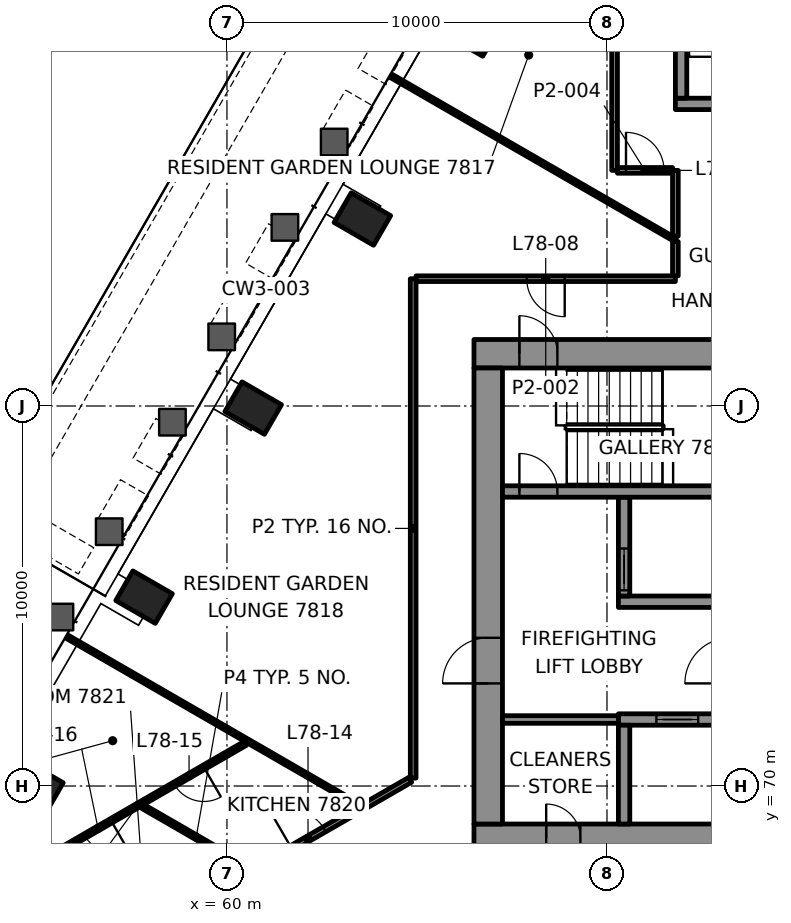
"""IFC4 building model, lengths in metres.
Left out: names, types, materials, properties, quantities, classifications, styles, units other than length and angle.
Written with IfcOpenShell. Run it as: python <this file> out.ifc"""

import sys

from ifc_helpers import new_model, si_unit, direction, frame, frame_2d, origin, origin_2d, place, context, subcontext, project, spatial, rectangle, hollow_rectangle, extrude, element, fill, save


model = new_model("IFC4")
c1 = context("Model", 3, precision=1e-05, world=origin(), true_north=direction((0.0, 1.0)))
c2 = subcontext(c1, "Body", "Model", "MODEL_VIEW")
j1 = project(units=[si_unit("LENGTHUNIT", "METRE"), si_unit("PLANEANGLEUNIT", "RADIAN")], contexts=[c1])
p1 = place(None, origin())
s1 = spatial("IfcSite", under=j1, at=p1, CompositionType="ELEMENT")
p2 = place(p1, origin())
s2 = spatial("IfcBuilding", under=s1, at=p2, CompositionType="ELEMENT")
p3 = place(p2, frame((0.0, 0.0, 319.6)))
s3 = spatial("IfcBuildingStorey", under=s2, at=p3, CompositionType="ELEMENT", Elevation=319.6)
for number, where, z_axis, x_axis in (
    (1, (66.435, 89.894, -0.0), (0.0, 0.0, 1.0), (-0.5, -0.866, 0.0)),
    (2, (63.563, 84.919, -0.0), (0.0, 0.0, 1.0), (-0.5, -0.866, 0.0)),
    (3, (60.691, 79.945, -0.0), (0.0, 0.0, 1.0), (-0.5, -0.866, 0.0)),
    (4, (57.819, 74.97, -0.0), (0.0, 0.0, 1.0), (-0.5, -0.866, 0.0)),
    (5, (54.948, 69.996, -0.0), (0.0, 0.0, 1.0), (-0.5, -0.866, 0.0)),
):
    element("IfcColumn", number, at=place(p3, frame(where, z_axis=z_axis, x_axis=x_axis)), inside=s3, PredefinedType="COLUMN", context=c2, shape_type="SweptSolid", body=[
        extrude(hollow_rectangle(XDim=0.9, YDim=1.2, WallThickness=0.06, at=origin_2d()), origin(), (0.0, 0.0, 1.0), 3.5),
    ])
p4 = place(p3, frame((66.5, 68.625, 0.0), z_axis=(0.0, 0.0, 1.0), x_axis=(1.0, 0.0, 0.0)))
e6 = element("IfcWall", 6, at=p4, inside=s3, PredefinedType="SHEAR", context=c2, shape_type="SweptSolid", body=[
    extrude(rectangle(XDim=17.0, YDim=0.75, at=frame_2d((8.5, 0.0))), origin(), (0.0, 0.0, 1.0), 3.3),
])
p5 = place(p4, frame((1.9, 0.0, 0.0)))
e7 = element("IfcOpeningElement", 7, at=p5, cuts=e6, PredefinedType="OPENING", context=c2, shape_type="SweptSolid", body=[
    extrude(rectangle(XDim=0.9, YDim=2.1, at=frame_2d((0.45, 1.05))), frame((0.0, 0.385, 0.0), z_axis=(0.0, -1.0, 0.0), x_axis=(1.0, 0.0, 0.0)), (0.0, 0.0, 1.0), 0.77),
])
p6 = place(p3, frame((66.5, 81.375, 0.0), z_axis=(0.0, 0.0, 1.0), x_axis=(1.0, 0.0, 0.0)))
e8 = element("IfcWall", 8, at=p6, inside=s3, PredefinedType="SHEAR", context=c2, shape_type="SweptSolid", body=[
    extrude(rectangle(XDim=17.0, YDim=0.75, at=frame_2d((8.5, 0.0))), origin(), (0.0, 0.0, 1.0), 3.3),
])
p7 = place(p6, frame((1.195, 0.0, 0.0)))
e9 = element("IfcOpeningElement", 9, at=p7, cuts=e8, PredefinedType="OPENING", context=c2, shape_type="SweptSolid", body=[
    extrude(rectangle(XDim=1.0, YDim=2.1, at=frame_2d((0.5, 1.05))), frame((0.0, 0.385, 0.0), z_axis=(0.0, -1.0, 0.0), x_axis=(1.0, 0.0, 0.0)), (0.0, 0.0, 1.0), 0.77),
])
p8 = place(p6, frame((15.005, 0.0, 0.0)))
e10 = element("IfcOpeningElement", 10, at=p8, cuts=e8, PredefinedType="OPENING", context=c2, shape_type="SweptSolid", body=[
    extrude(rectangle(XDim=1.0, YDim=2.1, at=frame_2d((0.5, 1.05))), frame((0.0, 0.385, 0.0), z_axis=(0.0, -1.0, 0.0), x_axis=(1.0, 0.0, 0.0)), (0.0, 0.0, 1.0), 0.77),
])
p9 = place(p6, frame((8.15, 0.0, 0.0)))
e11 = element("IfcOpeningElement", 11, at=p9, cuts=e8, PredefinedType="OPENING", context=c2, shape_type="SweptSolid", body=[
    extrude(rectangle(XDim=0.9, YDim=2.1, at=frame_2d((0.45, 1.05))), frame((0.0, 0.385, 0.0), z_axis=(0.0, -1.0, 0.0), x_axis=(1.0, 0.0, 0.0)), (0.0, 0.0, 1.0), 0.77),
])
p10 = place(p3, frame((66.875, 69.0, 0.0), z_axis=(0.0, 0.0, 1.0), x_axis=(0.0, 1.0, 0.0)))
e12 = element("IfcWall", 12, at=p10, inside=s3, PredefinedType="SHEAR", context=c2, shape_type="SweptSolid", body=[
    extrude(rectangle(XDim=12.0, YDim=0.75, at=frame_2d((6.0, 0.0))), origin(), (0.0, 0.0, 1.0), 3.3),
])
p11 = place(p10, frame((3.7, 0.0, 0.0)))
e13 = element("IfcOpeningElement", 13, at=p11, cuts=e12, PredefinedType="OPENING", context=c2, shape_type="SweptSolid", body=[
    extrude(rectangle(XDim=1.2, YDim=2.1, at=frame_2d((0.6, 1.05))), frame((0.0, 0.385, 0.0), z_axis=(0.0, -1.0, 0.0), x_axis=(1.0, 0.0, 0.0)), (0.0, 0.0, 1.0), 0.77),
])
p12 = place(p3, frame((70.3, 71.75, 0.0), z_axis=(0.0, 0.0, 1.0), x_axis=(1.0, 0.0, 0.0)))
e14 = element("IfcWall", 14, at=p12, inside=s3, PredefinedType="SHEAR", context=c2, shape_type="SweptSolid", body=[
    extrude(rectangle(XDim=11.5, YDim=0.3, at=frame_2d((5.75, 0.0))), origin(), (0.0, 0.0, 1.0), 3.3),
])
p13 = place(p12, frame((1.0, 0.0, 0.0)))
e15 = element("IfcOpeningElement", 15, at=p13, cuts=e14, PredefinedType="OPENING", context=c2, shape_type="SweptSolid", body=[
    extrude(rectangle(XDim=1.1, YDim=2.1, at=frame_2d((0.55, 1.05))), frame((0.0, 0.16, 0.0), z_axis=(0.0, -1.0, 0.0), x_axis=(1.0, 0.0, 0.0)), (0.0, 0.0, 1.0), 0.32),
])
p14 = place(p12, frame((3.8, 0.0, 0.0)))
e16 = element("IfcOpeningElement", 16, at=p14, cuts=e14, PredefinedType="OPENING", context=c2, shape_type="SweptSolid", body=[
    extrude(rectangle(XDim=1.1, YDim=2.1, at=frame_2d((0.55, 1.05))), frame((0.0, 0.16, 0.0), z_axis=(0.0, -1.0, 0.0), x_axis=(1.0, 0.0, 0.0)), (0.0, 0.0, 1.0), 0.32),
])
p15 = place(p12, frame((6.6, 0.0, 0.0)))
e17 = element("IfcOpeningElement", 17, at=p15, cuts=e14, PredefinedType="OPENING", context=c2, shape_type="SweptSolid", body=[
    extrude(rectangle(XDim=1.1, YDim=2.1, at=frame_2d((0.55, 1.05))), frame((0.0, 0.16, 0.0), z_axis=(0.0, -1.0, 0.0), x_axis=(1.0, 0.0, 0.0)), (0.0, 0.0, 1.0), 0.32),
])
p16 = place(p12, frame((9.4, 0.0, 0.0)))
e18 = element("IfcOpeningElement", 18, at=p16, cuts=e14, PredefinedType="OPENING", context=c2, shape_type="SweptSolid", body=[
    extrude(rectangle(XDim=1.1, YDim=2.1, at=frame_2d((0.55, 1.05))), frame((0.0, 0.16, 0.0), z_axis=(0.0, -1.0, 0.0), x_axis=(1.0, 0.0, 0.0)), (0.0, 0.0, 1.0), 0.32),
])
p17 = place(p3, frame((70.3, 74.85, 0.0), z_axis=(0.0, 0.0, 1.0), x_axis=(1.0, 0.0, 0.0)))
e19 = element("IfcWall", 19, at=p17, inside=s3, PredefinedType="SHEAR", context=c2, shape_type="SweptSolid", body=[
    extrude(rectangle(XDim=5.9, YDim=0.3, at=frame_2d((2.95, 0.0))), origin(), (0.0, 0.0, 1.0), 3.3),
])
p18 = place(p17, frame((3.8, 0.0, 0.0)))
e20 = element("IfcOpeningElement", 20, at=p18, cuts=e19, PredefinedType="OPENING", context=c2, shape_type="SweptSolid", body=[
    extrude(rectangle(XDim=1.1, YDim=2.1, at=frame_2d((0.55, 1.05))), frame((0.0, 0.16, 0.0), z_axis=(0.0, -1.0, 0.0), x_axis=(1.0, 0.0, 0.0)), (0.0, 0.0, 1.0), 0.32),
])
p19 = place(p3, frame((70.45, 69.0, 0.0), z_axis=(0.0, 0.0, 1.0), x_axis=(0.0, 1.0, 0.0)))
e21 = element("IfcWall", 21, at=p19, inside=s3, PredefinedType="SHEAR", context=c2, shape_type="SweptSolid", body=[
    extrude(rectangle(XDim=2.6, YDim=0.3, at=frame_2d((1.3, 0.0))), origin(), (0.0, 0.0, 1.0), 3.3),
])
p20 = place(p3, frame((70.45, 75.0, 0.0), z_axis=(0.0, 0.0, 1.0), x_axis=(0.0, 1.0, 0.0)))
e22 = element("IfcWall", 22, at=p20, inside=s3, PredefinedType="SHEAR", context=c2, shape_type="SweptSolid", body=[
    extrude(rectangle(XDim=2.6, YDim=0.3, at=frame_2d((1.3, 0.0))), origin(), (0.0, 0.0, 1.0), 3.3),
])
p21 = place(p20, frame((0.15, 0.0, 0.0)))
e23 = element("IfcOpeningElement", 23, at=p21, cuts=e22, PredefinedType="OPENING", context=c2, shape_type="SweptSolid", body=[
    extrude(rectangle(XDim=1.1, YDim=2.1, at=frame_2d((0.55, 1.05))), frame((0.0, 0.16, 0.0), z_axis=(0.0, -1.0, 0.0), x_axis=(1.0, 0.0, 0.0)), (0.0, 0.0, 1.0), 0.32),
])
p22 = place(p3, frame((67.25, 77.75, 0.0), z_axis=(0.0, 0.0, 1.0), x_axis=(1.0, 0.0, 0.0)))
e24 = element("IfcWall", 24, at=p22, inside=s3, PredefinedType="SHEAR", context=c2, shape_type="SweptSolid", body=[
    extrude(rectangle(XDim=15.5, YDim=0.3, at=frame_2d((7.75, 0.0))), origin(), (0.0, 0.0, 1.0), 3.3),
])
p23 = place(p22, frame((0.445, 0.0, 0.0)))
e25 = element("IfcOpeningElement", 25, at=p23, cuts=e24, PredefinedType="OPENING", context=c2, shape_type="SweptSolid", body=[
    extrude(rectangle(XDim=1.0, YDim=2.1, at=frame_2d((0.5, 1.05))), frame((0.0, 0.16, 0.0), z_axis=(0.0, -1.0, 0.0), x_axis=(1.0, 0.0, 0.0)), (0.0, 0.0, 1.0), 0.32),
])
p24 = place(p3, frame((71.8, 87.95, 0.0), z_axis=(0.0, 0.0, 1.0), x_axis=(1.0, 0.0, 0.0)))
e26 = element("IfcWall", 26, at=p24, inside=s3, PredefinedType="SHEAR", context=c2, shape_type="SweptSolid", body=[
    extrude(rectangle(XDim=6.4, YDim=0.3, at=frame_2d((3.2, 0.0))), origin(), (0.0, 0.0, 1.0), 3.3),
])
p25 = place(p24, frame((1.325, 0.0, 0.0)))
e27 = element("IfcOpeningElement", 27, at=p25, cuts=e26, PredefinedType="OPENING", context=c2, shape_type="SweptSolid", body=[
    extrude(rectangle(XDim=1.0, YDim=2.1, at=frame_2d((0.5, 1.05))), frame((0.0, 0.16, 0.0), z_axis=(0.0, -1.0, 0.0), x_axis=(1.0, 0.0, 0.0)), (0.0, 0.0, 1.0), 0.32),
])
p26 = place(p24, frame((4.125, 0.0, 0.0)))
e28 = element("IfcOpeningElement", 28, at=p26, cuts=e26, PredefinedType="OPENING", context=c2, shape_type="SweptSolid", body=[
    extrude(rectangle(XDim=1.2, YDim=2.1, at=frame_2d((0.6, 1.05))), frame((0.0, 0.16, 0.0), z_axis=(0.0, -1.0, 0.0), x_axis=(1.0, 0.0, 0.0)), (0.0, 0.0, 1.0), 0.32),
])
p27 = place(p3, frame((71.95, 88.1, 0.0), z_axis=(0.0, 0.0, 1.0), x_axis=(0.0, 1.0, 0.0)))
e29 = element("IfcWall", 29, at=p27, inside=s3, PredefinedType="SHEAR", context=c2, shape_type="SweptSolid", body=[
    extrude(rectangle(XDim=6.2, YDim=0.3, at=frame_2d((3.1, 0.0))), origin(), (0.0, 0.0, 1.0), 3.3),
])
p28 = place(p3, frame((71.8, 83.35, 0.0), z_axis=(0.0, 0.0, 1.0), x_axis=(-1.0, 0.0, 0.0)))
e30 = element("IfcWall", 30, at=p28, inside=s3, PredefinedType="PARTITIONING", context=c2, shape_type="SweptSolid", body=[
    extrude(rectangle(XDim=6.824, YDim=0.15, at=frame_2d((3.412, 0.0))), origin(), (0.0, 0.0, 1.0), 2.7),
])
p29 = place(p28, frame((2.912, 0.0, 0.0)))
e31 = element("IfcOpeningElement", 31, at=p29, cuts=e30, PredefinedType="OPENING", context=c2, shape_type="SweptSolid", body=[
    extrude(rectangle(XDim=1.0, YDim=2.1, at=frame_2d((0.5, 1.05))), frame((0.0, 0.085, 0.0), z_axis=(0.0, -1.0, 0.0), x_axis=(1.0, 0.0, 0.0)), (0.0, 0.0, 1.0), 0.17),
])
p30 = place(p3, frame((70.276, 86.2, 0.0), z_axis=(0.0, 0.0, 1.0), x_axis=(1.0, 0.0, 0.0)))
e32 = element("IfcWall", 32, at=p30, inside=s3, PredefinedType="PARTITIONING", context=c2, shape_type="SweptSolid", body=[
    extrude(rectangle(XDim=1.449, YDim=0.15, at=frame_2d((0.725, 0.0))), origin(), (0.0, 0.0, 1.0), 2.7),
])
p31 = place(p30, frame((0.225, 0.0, 0.0)))
e33 = element("IfcOpeningElement", 33, at=p31, cuts=e32, PredefinedType="OPENING", context=c2, shape_type="SweptSolid", body=[
    extrude(rectangle(XDim=1.0, YDim=2.1, at=frame_2d((0.5, 1.05))), frame((0.0, 0.085, 0.0), z_axis=(0.0, -1.0, 0.0), x_axis=(1.0, 0.0, 0.0)), (0.0, 0.0, 1.0), 0.17),
])
p32 = place(p3, frame((55.244, 64.634, 0.0), z_axis=(0.0, 0.0, 1.0), x_axis=(0.866029028053, 0.499993722531, 0.0)))
e34 = element("IfcWall", 34, at=p32, inside=s3, PredefinedType="PARTITIONING", context=c2, shape_type="SweptSolid", body=[
    extrude(rectangle(XDim=11.063, YDim=0.15, at=frame_2d((5.531, 0.0))), origin(), (0.0, 0.0, 1.0), 2.7),
])
p33 = place(p32, frame((7.454, 0.0, 0.0)))
e35 = element("IfcOpeningElement", 35, at=p33, cuts=e34, PredefinedType="OPENING", context=c2, shape_type="SweptSolid", body=[
    extrude(rectangle(XDim=1.0, YDim=2.1, at=frame_2d((0.5, 1.05))), frame((0.0, 0.085, 0.0), z_axis=(0.0, -1.0, 0.0), x_axis=(1.0, 0.0, 0.0)), (0.0, 0.0, 1.0), 0.17),
])
p34 = place(p3, frame((60.485, 71.123, 0.0), z_axis=(0.0, 0.0, 1.0), x_axis=(-0.866018230694, -0.500012423951, 0.0)))
e36 = element("IfcWall", 36, at=p34, inside=s3, PredefinedType="PARTITIONING", context=c2, shape_type="SweptSolid", body=[
    extrude(rectangle(XDim=6.535, YDim=0.12, at=frame_2d((3.268, 0.0))), origin(), (0.0, 0.0, 1.0), 2.7),
])
p35 = place(p34, frame((1.261, 0.0, 0.0)))
e37 = element("IfcOpeningElement", 37, at=p35, cuts=e36, PredefinedType="OPENING", context=c2, shape_type="SweptSolid", body=[
    extrude(rectangle(XDim=0.9, YDim=2.1, at=frame_2d((0.45, 1.05))), frame((0.0, 0.07, 0.0), z_axis=(0.0, -1.0, 0.0), x_axis=(1.0, 0.0, 0.0)), (0.0, 0.0, 1.0), 0.14),
])
p36 = place(p34, frame((4.077, 0.0, 0.0)))
e38 = element("IfcOpeningElement", 38, at=p36, cuts=e36, PredefinedType="OPENING", context=c2, shape_type="SweptSolid", body=[
    extrude(rectangle(XDim=0.8, YDim=2.1, at=frame_2d((0.4, 1.05))), frame((0.0, 0.07, 0.0), z_axis=(0.0, -1.0, 0.0), x_axis=(1.0, 0.0, 0.0)), (0.0, 0.0, 1.0), 0.14),
])
p37 = place(p3, frame((71.8, 83.425, 0.0), z_axis=(0.0, 0.0, 1.0), x_axis=(0.0, 1.0, 0.0)))
e39 = element("IfcWall", 39, at=p37, inside=s3, PredefinedType="PARTITIONING", context=c2, shape_type="SweptSolid", body=[
    extrude(rectangle(XDim=0.901, YDim=0.15, at=frame_2d((0.451, 0.0))), origin(), (0.0, 0.0, 1.0), 2.7),
])
p38 = place(p3, frame((70.2, 86.2, 0.0), z_axis=(0.0, 0.0, 1.0), x_axis=(0.0, 1.0, 0.0)))
e40 = element("IfcWall", 40, at=p38, inside=s3, PredefinedType="PARTITIONING", context=c2, shape_type="SweptSolid", body=[
    extrude(rectangle(XDim=9.999, YDim=0.15, at=frame_2d((5.0, 0.0))), origin(), (0.0, 0.0, 1.0), 2.7),
])
p39 = place(p3, frame((64.9, 70.208, 0.0), z_axis=(0.0, 0.0, 1.0), x_axis=(0.0, 1.0, 0.0)))
e41 = element("IfcWall", 41, at=p39, inside=s3, PredefinedType="PARTITIONING", context=c2, shape_type="SweptSolid", body=[
    extrude(rectangle(XDim=13.141, YDim=0.15, at=frame_2d((6.571, 0.0))), origin(), (0.0, 0.0, 1.0), 2.7),
])
p40 = place(p3, frame((71.8, 84.369, 0.0), z_axis=(0.0, 0.0, 1.0), x_axis=(-0.866030088378, 0.499991885958, 0.0)))
e42 = element("IfcWall", 42, at=p40, inside=s3, PredefinedType="PARTITIONING", context=c2, shape_type="SweptSolid", body=[
    extrude(rectangle(XDim=8.628, YDim=0.1, at=frame_2d((4.314, 0.0))), origin(), (0.0, 0.0, 1.0), 2.688),
])
p41 = place(p3, frame((63.468, 69.498, 0.0), z_axis=(0.0, 0.0, 1.0), x_axis=(-0.866028903224, 0.499993938743, 0.0)))
e43 = element("IfcWall", 43, at=p41, inside=s3, PredefinedType="PARTITIONING", context=c2, shape_type="SweptSolid", body=[
    extrude(rectangle(XDim=8.848, YDim=0.1, at=frame_2d((4.424, 0.0))), origin(), (0.0, 0.0, 1.0), 2.7),
])
p42 = place(p3, frame((60.588, 67.845, 0.0), z_axis=(0.0, 0.0, 1.0), x_axis=(-0.86605210011, 0.499953757757, 0.0)))
e44 = element("IfcWall", 44, at=p42, inside=s3, PredefinedType="PARTITIONING", context=c2, shape_type="SweptSolid", body=[
    extrude(rectangle(XDim=3.228, YDim=0.12, at=frame_2d((1.614, 0.0))), origin(), (0.0, 0.0, 1.0), 2.7),
])
p43 = place(p3, frame((71.8, 84.47, 0.0), z_axis=(0.0, 0.0, 1.0), x_axis=(0.0, 1.0, 0.0)))
e45 = element("IfcWall", 45, at=p43, inside=s3, PredefinedType="PARTITIONING", context=c2, shape_type="SweptSolid", body=[
    extrude(rectangle(XDim=1.729, YDim=0.15, at=frame_2d((0.865, 0.0))), origin(), (0.0, 0.0, 1.0), 2.7),
])
p44 = place(p3, frame((69.117, 103.238, 0.0), z_axis=(0.0, 0.0, 1.0), x_axis=(-0.500002433271, -0.86602399893, 0.0)))
e46 = element("IfcWall", 46, at=p44, inside=s3, PredefinedType="SOLIDWALL", context=c2, shape_type="SweptSolid", body=[
    extrude(rectangle(XDim=29.715, YDim=0.8, at=frame_2d((14.857, 0.0))), origin(), (0.0, 0.0, 1.0), 0.9),
])
p45 = place(p3, frame((54.388, 77.026, 0.0), z_axis=(0.0, 0.0, 1.0), x_axis=(0.866008176907, -0.50002983664, 0.0)))
e47 = element("IfcWall", 47, at=p45, inside=s3, PredefinedType="SOLIDWALL", context=c2, shape_type="SweptSolid", body=[
    extrude(rectangle(XDim=2.2, YDim=0.8, at=frame_2d((1.1, 0.0))), origin(), (0.0, 0.0, 1.0), 0.9),
])
p46 = place(p3, frame((67.25, 71.75, 0.0), z_axis=(0.0, 0.0, 1.0), x_axis=(1.0, 0.0, 0.0)))
e48 = element("IfcWall", 48, at=p46, inside=s3, PredefinedType="PARTITIONING", context=c2, shape_type="SweptSolid", body=[
    extrude(rectangle(XDim=3.05, YDim=0.2, at=frame_2d((1.525, 0.0))), origin(), (0.0, 0.0, 1.0), 3.3),
])
p47 = place(p29, origin())
e49 = element("IfcDoor", 49, at=p47, inside=s3, OperationType="SINGLE_SWING_RIGHT", PredefinedType="DOOR", context=c2, shape_type="SweptSolid", body=[
    extrude(rectangle(XDim=1.0, YDim=2.1, at=frame_2d((0.5, 1.05))), frame((0.0, 0.025, 0.0), z_axis=(0.0, -1.0, 0.0), x_axis=(1.0, 0.0, 0.0)), (0.0, 0.0, 1.0), 0.05),
])
fill(e31, e49)
p48 = place(p31, origin())
e50 = element("IfcDoor", 50, at=p48, inside=s3, OperationType="SINGLE_SWING_RIGHT", PredefinedType="DOOR", context=c2, shape_type="SweptSolid", body=[
    extrude(rectangle(XDim=1.0, YDim=2.1, at=frame_2d((0.5, 1.05))), frame((0.0, 0.025, 0.0), z_axis=(0.0, -1.0, 0.0), x_axis=(1.0, 0.0, 0.0)), (0.0, 0.0, 1.0), 0.05),
])
fill(e33, e50)
p49 = place(p33, origin())
e51 = element("IfcDoor", 51, at=p49, inside=s3, OperationType="SINGLE_SWING_LEFT", PredefinedType="DOOR", context=c2, shape_type="SweptSolid", body=[
    extrude(rectangle(XDim=1.0, YDim=2.1, at=frame_2d((0.5, 1.05))), frame((0.0, 0.025, 0.0), z_axis=(0.0, -1.0, 0.0), x_axis=(1.0, 0.0, 0.0)), (0.0, 0.0, 1.0), 0.05),
])
fill(e35, e51)
p50 = place(p35, origin())
e52 = element("IfcDoor", 52, at=p50, inside=s3, OperationType="SINGLE_SWING_LEFT", PredefinedType="DOOR", context=c2, shape_type="SweptSolid", body=[
    extrude(rectangle(XDim=0.9, YDim=2.1, at=frame_2d((0.45, 1.05))), frame((0.0, 0.025, 0.0), z_axis=(0.0, -1.0, 0.0), x_axis=(1.0, 0.0, 0.0)), (0.0, 0.0, 1.0), 0.05),
])
fill(e37, e52)
p51 = place(p36, origin())
e53 = element("IfcDoor", 53, at=p51, inside=s3, OperationType="SINGLE_SWING_LEFT", PredefinedType="DOOR", context=c2, shape_type="SweptSolid", body=[
    extrude(rectangle(XDim=0.8, YDim=2.1, at=frame_2d((0.4, 1.05))), frame((0.0, 0.025, 0.0), z_axis=(0.0, -1.0, 0.0), x_axis=(1.0, 0.0, 0.0)), (0.0, 0.0, 1.0), 0.05),
])
fill(e38, e53)
p52 = place(p13, origin())
e54 = element("IfcDoor", 54, at=p52, inside=s3, OperationType="DOUBLE_DOOR_SLIDING", PredefinedType="DOOR", context=c2, shape_type="SweptSolid", body=[
    extrude(rectangle(XDim=1.1, YDim=2.1, at=frame_2d((0.55, 1.05))), frame((0.0, 0.025, 0.0), z_axis=(0.0, -1.0, 0.0), x_axis=(1.0, 0.0, 0.0)), (0.0, 0.0, 1.0), 0.05),
])
fill(e15, e54)
p53 = place(p21, origin())
e55 = element("IfcDoor", 55, at=p53, inside=s3, OperationType="DOUBLE_DOOR_SLIDING", PredefinedType="DOOR", context=c2, shape_type="SweptSolid", body=[
    extrude(rectangle(XDim=1.1, YDim=2.1, at=frame_2d((0.55, 1.05))), frame((0.0, 0.025, 0.0), z_axis=(0.0, -1.0, 0.0), x_axis=(1.0, 0.0, 0.0)), (0.0, 0.0, 1.0), 0.05),
])
fill(e23, e55)
p54 = place(p23, origin())
e56 = element("IfcDoor", 56, at=p54, inside=s3, OperationType="SINGLE_SWING_LEFT", PredefinedType="DOOR", context=c2, shape_type="SweptSolid", body=[
    extrude(rectangle(XDim=1.0, YDim=2.1, at=frame_2d((0.5, 1.05))), frame((0.0, 0.025, 0.0), z_axis=(0.0, -1.0, 0.0), x_axis=(1.0, 0.0, 0.0)), (0.0, 0.0, 1.0), 0.05),
])
fill(e25, e56)
p55 = place(p7, origin())
e57 = element("IfcDoor", 57, at=p55, inside=s3, OperationType="SINGLE_SWING_RIGHT", PredefinedType="DOOR", context=c2, shape_type="SweptSolid", body=[
    extrude(rectangle(XDim=1.0, YDim=2.1, at=frame_2d((0.5, 1.05))), frame((0.0, 0.095, 0.0), z_axis=(0.0, -1.0, 0.0), x_axis=(1.0, 0.0, 0.0)), (0.0, 0.0, 1.0), 0.19),
])
fill(e9, e57)
p56 = place(p11, origin())
e58 = element("IfcDoor", 58, at=p56, inside=s3, OperationType="SINGLE_SWING_RIGHT", PredefinedType="DOOR", context=c2, shape_type="SweptSolid", body=[
    extrude(rectangle(XDim=1.2, YDim=2.1, at=frame_2d((0.6, 1.05))), frame((0.0, 0.095, 0.0), z_axis=(0.0, -1.0, 0.0), x_axis=(1.0, 0.0, 0.0)), (0.0, 0.0, 1.0), 0.19),
])
fill(e13, e58)
p57 = place(p5, origin())
e59 = element("IfcDoor", 59, at=p57, inside=s3, OperationType="SINGLE_SWING_RIGHT", PredefinedType="DOOR", context=c2, shape_type="SweptSolid", body=[
    extrude(rectangle(XDim=0.9, YDim=2.1, at=frame_2d((0.45, 1.05))), frame((0.0, 0.095, 0.0), z_axis=(0.0, -1.0, 0.0), x_axis=(1.0, 0.0, 0.0)), (0.0, 0.0, 1.0), 0.19),
])
fill(e7, e59)
save(model, sys.argv[1])
